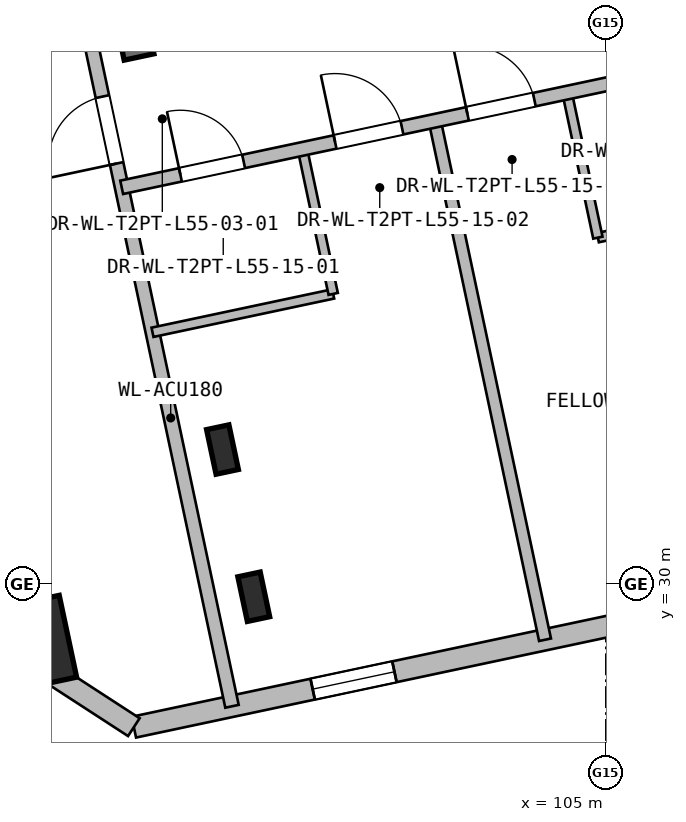
"""IFC4 building model, lengths in metres.
Left out: names, types, materials, properties, quantities, classifications, styles, units other than length and angle.
Written with IfcOpenShell. Run it as: python <this file> out.ifc"""

import sys

from ifc_helpers import new_model, si_unit, direction, frame, frame_2d, origin, origin_2d, place, context, subcontext, project, spatial, rectangle, hollow_rectangle, i_section, extrude, element, fill, save


model = new_model("IFC4")
c1 = context("Model", 3, precision=1e-05, world=origin(), true_north=direction((0.0, 1.0)))
c2 = subcontext(c1, "Body", "Model", "MODEL_VIEW")
j1 = project(units=[si_unit("LENGTHUNIT", "METRE"), si_unit("PLANEANGLEUNIT", "RADIAN")], contexts=[c1])
p1 = place(None, origin())
s1 = spatial("IfcSite", under=j1, at=p1, CompositionType="ELEMENT")
p2 = place(p1, origin())
s2 = spatial("IfcBuilding", under=s1, at=p2, CompositionType="ELEMENT")
p3 = place(p2, frame((0.0, 0.0, 201.3)))
s3 = spatial("IfcBuildingStorey", under=s2, at=p3, CompositionType="ELEMENT", Elevation=201.3)
p4 = place(p3, frame((98.86, 36.934, 0.0), z_axis=(0.0, 0.0, 1.0), x_axis=(-0.20790924889, 0.978148119778, 0.0)))
e1 = element("IfcWall", 1, at=p4, inside=s3, PredefinedType="SHEAR", context=c2, shape_type="SweptSolid", body=[
    extrude(rectangle(XDim=10.12, YDim=0.4, at=frame_2d((5.06, 0.0))), origin(), (0.0, 0.0, 1.0), 4.2),
])
p5 = place(p3, frame((97.386, 29.198, 0.0), z_axis=(0.0, 0.0, 1.0), x_axis=(0.978147600734, 0.207911690818, 0.0)))
e2 = element("IfcColumn", 2, at=p5, inside=s3, PredefinedType="COLUMN", context=c2, shape_type="SweptSolid", body=[
    extrude(hollow_rectangle(XDim=1.1, YDim=1.1, WallThickness=0.032, at=origin_2d()), origin(), (0.0, 0.0, 1.0), 4.2),
])
for number, where, z_axis, x_axis in (
    (3, (100.37, 29.833, 0.0), (0.0, 0.0, 1.0), (0.978, 0.208, 0.0)),
    (4, (99.958, 31.769, 0.0), (0.0, 0.0, 1.0), (0.978, 0.208, 0.0)),
):
    element("IfcColumn", number, at=place(p3, frame(where, z_axis=z_axis, x_axis=x_axis)), inside=s3, PredefinedType="COLUMN", context=c2, shape_type="SweptSolid", body=[
        extrude(i_section(OverallWidth=0.3, OverallDepth=0.6, WebThickness=0.014, FlangeThickness=0.025, at=origin_2d()), origin(), (0.0, 0.0, 1.0), 4.2),
    ])
p6 = place(p3, frame((123.05, 33.273, 0.0), z_axis=(0.0, 0.0, 1.0), x_axis=(-0.97814726544, -0.207913268245, 0.0)))
e5 = element("IfcWall", 5, at=p6, inside=s3, PredefinedType="SOLIDWALL", context=c2, shape_type="SweptSolid", body=[
    extrude(rectangle(XDim=24.8, YDim=0.28, at=frame_2d((12.4, 0.0))), origin(), (0.0, 0.0, 1.0), 3.93),
])
p7 = place(p6, frame((21.295, 0.0, 0.8)))
e6 = element("IfcOpeningElement", 6, at=p7, cuts=e5, PredefinedType="OPENING", context=c2, shape_type="SweptSolid", body=[
    extrude(rectangle(XDim=1.1, YDim=1.5, at=frame_2d((0.55, 0.75))), frame((0.0, 0.15, 0.0), z_axis=(0.0, -1.0, 0.0), x_axis=(1.0, 0.0, 0.0)), (0.0, 0.0, 1.0), 0.3),
])
p8 = place(p6, frame((11.486, 0.0, 0.8)))
e7 = element("IfcOpeningElement", 7, at=p8, cuts=e5, PredefinedType="OPENING", context=c2, shape_type="SweptSolid", body=[
    extrude(rectangle(XDim=2.05, YDim=1.9, at=frame_2d((1.025, 0.95))), frame((0.0, 0.15, 0.0), z_axis=(0.0, -1.0, 0.0), x_axis=(1.0, 0.0, 0.0)), (0.0, 0.0, 1.0), 0.3),
])
p9 = place(p6, frame((2.472, 0.0, 0.8)))
e8 = element("IfcOpeningElement", 8, at=p9, cuts=e5, PredefinedType="OPENING", context=c2, shape_type="SweptSolid", body=[
    extrude(rectangle(XDim=1.1, YDim=1.5, at=frame_2d((0.55, 0.75))), frame((0.0, 0.15, 0.0), z_axis=(0.0, -1.0, 0.0), x_axis=(1.0, 0.0, 0.0)), (0.0, 0.0, 1.0), 0.3),
])
p10 = place(p3, frame((98.792, 28.117, 0.0), z_axis=(0.0, 0.0, 1.0), x_axis=(-0.838672309694, 0.544636352948, 0.0)))
e9 = element("IfcWall", 9, at=p10, inside=s3, PredefinedType="SOLIDWALL", context=c2, shape_type="SweptSolid", body=[
    extrude(rectangle(XDim=3.535, YDim=0.28, at=frame_2d((1.768, 0.0))), origin(), (0.0, 0.0, 1.0), 3.93),
])
p11 = place(p3, frame((100.083, 28.391, 0.0), z_axis=(0.0, 0.0, 1.0), x_axis=(-0.207908966823, 0.978148179733, 0.0)))
e10 = element("IfcWall", 10, at=p11, inside=s3, PredefinedType="PARTITIONING", context=c2, shape_type="SweptSolid", body=[
    extrude(rectangle(XDim=9.13, YDim=0.18, at=frame_2d((4.565, 0.0))), origin(), (0.0, 0.0, 1.0), 3.93),
])
p12 = place(p11, frame((7.3, 0.0, 0.0)))
e11 = element("IfcOpeningElement", 11, at=p12, cuts=e10, PredefinedType="OPENING", context=c2, shape_type="SweptSolid", body=[
    extrude(rectangle(XDim=0.9, YDim=2.05, at=frame_2d((0.45, 1.025))), frame((0.0, 0.1, 0.0), z_axis=(0.0, -1.0, 0.0), x_axis=(1.0, 0.0, 0.0)), (0.0, 0.0, 1.0), 0.2),
])
p13 = place(p3, frame((99.037, 33.312, 0.0), z_axis=(0.0, 0.0, 1.0), x_axis=(0.978165487905, 0.207827520484, 0.0)))
e12 = element("IfcWall", 12, at=p13, inside=s3, PredefinedType="PARTITIONING", context=c2, shape_type="SweptSolid", body=[
    extrude(rectangle(XDim=2.43, YDim=0.125, at=frame_2d((1.215, 0.0))), origin(), (0.0, 0.0, 1.0), 3.93),
])
p14 = place(p3, frame((101.415, 33.817, 0.0), z_axis=(0.0, 0.0, 1.0), x_axis=(-0.207947096322, 0.978140074392, 0.0)))
e13 = element("IfcWall", 13, at=p14, inside=s3, PredefinedType="PARTITIONING", context=c2, shape_type="SweptSolid", body=[
    extrude(rectangle(XDim=1.95, YDim=0.125, at=frame_2d((0.975, 0.0))), origin(), (0.0, 0.0, 1.0), 3.93),
])
p15 = place(p3, frame((104.202, 29.267, 0.0), z_axis=(0.0, 0.0, 1.0), x_axis=(-0.207906863497, 0.9781486268, 0.0)))
e14 = element("IfcWall", 14, at=p15, inside=s3, PredefinedType="PARTITIONING", context=c2, shape_type="SweptSolid", body=[
    extrude(rectangle(XDim=6.98, YDim=0.16, at=frame_2d((3.49, 0.0))), origin(), (0.0, 0.0, 1.0), 3.93),
])
p16 = place(p3, frame((104.897, 34.557, 0.0), z_axis=(0.0, 0.0, 1.0), x_axis=(0.978155341176, 0.207875271565, 0.0)))
e15 = element("IfcWall", 15, at=p16, inside=s3, PredefinedType="PARTITIONING", context=c2, shape_type="SweptSolid", body=[
    extrude(rectangle(XDim=2.652, YDim=0.125, at=frame_2d((1.326, 0.0))), origin(), (0.0, 0.0, 1.0), 3.93),
])
p17 = place(p3, frame((104.897, 34.557, 0.0), z_axis=(0.0, 0.0, 1.0), x_axis=(-0.207947096322, 0.978140074392, 0.0)))
e16 = element("IfcWall", 16, at=p17, inside=s3, PredefinedType="PARTITIONING", context=c2, shape_type="SweptSolid", body=[
    extrude(rectangle(XDim=1.95, YDim=0.125, at=frame_2d((0.975, 0.0))), origin(), (0.0, 0.0, 1.0), 3.93),
])
p18 = place(p3, frame((98.632, 35.219, 0.0), z_axis=(0.0, 0.0, 1.0), x_axis=(0.978146753289, 0.207915677691, 0.0)))
e17 = element("IfcWall", 17, at=p18, inside=s3, PredefinedType="PARTITIONING", context=c2, shape_type="SweptSolid", body=[
    extrude(rectangle(XDim=22.16, YDim=0.18, at=frame_2d((11.08, 0.0))), origin(), (0.0, 0.0, 1.0), 3.93),
])
p19 = place(p18, frame((0.79, 0.0, 0.0)))
e18 = element("IfcOpeningElement", 18, at=p19, cuts=e17, PredefinedType="OPENING", context=c2, shape_type="SweptSolid", body=[
    extrude(rectangle(XDim=0.85, YDim=2.05, at=frame_2d((0.425, 1.025))), frame((0.0, 0.1, 0.0), z_axis=(0.0, -1.0, 0.0), x_axis=(1.0, 0.0, 0.0)), (0.0, 0.0, 1.0), 0.2),
])
p20 = place(p18, frame((2.87, 0.0, 0.0)))
e19 = element("IfcOpeningElement", 19, at=p20, cuts=e17, PredefinedType="OPENING", context=c2, shape_type="SweptSolid", body=[
    extrude(rectangle(XDim=0.9, YDim=2.05, at=frame_2d((0.45, 1.025))), frame((0.0, 0.1, 0.0), z_axis=(0.0, -1.0, 0.0), x_axis=(1.0, 0.0, 0.0)), (0.0, 0.0, 1.0), 0.2),
])
p21 = place(p18, frame((6.891, 0.0, 0.0)))
e20 = element("IfcOpeningElement", 20, at=p21, cuts=e17, PredefinedType="OPENING", context=c2, shape_type="SweptSolid", body=[
    extrude(rectangle(XDim=0.85, YDim=2.05, at=frame_2d((0.425, 1.025))), frame((0.0, 0.1, 0.0), z_axis=(0.0, -1.0, 0.0), x_axis=(1.0, 0.0, 0.0)), (0.0, 0.0, 1.0), 0.2),
])
p22 = place(p18, frame((4.65, 0.0, 0.0)))
e21 = element("IfcOpeningElement", 21, at=p22, cuts=e17, PredefinedType="OPENING", context=c2, shape_type="SweptSolid", body=[
    extrude(rectangle(XDim=0.9, YDim=2.05, at=frame_2d((0.45, 1.025))), frame((0.0, 0.1, 0.0), z_axis=(0.0, -1.0, 0.0), x_axis=(1.0, 0.0, 0.0)), (0.0, 0.0, 1.0), 0.2),
])
p23 = place(p18, frame((10.494, 0.0, 0.0)))
e22 = element("IfcOpeningElement", 22, at=p23, cuts=e17, PredefinedType="OPENING", context=c2, shape_type="SweptSolid", body=[
    extrude(rectangle(XDim=0.95, YDim=2.1, at=frame_2d((0.475, 1.05))), frame((0.0, 0.1, 0.0), z_axis=(0.0, -1.0, 0.0), x_axis=(1.0, 0.0, 0.0)), (0.0, 0.0, 1.0), 0.2),
])
p24 = place(p18, frame((15.037, 0.0, 0.0)))
e23 = element("IfcOpeningElement", 23, at=p24, cuts=e17, PredefinedType="OPENING", context=c2, shape_type="SweptSolid", body=[
    extrude(rectangle(XDim=0.98, YDim=2.1, at=frame_2d((0.49, 1.05))), frame((0.0, 0.1, 0.0), z_axis=(0.0, -1.0, 0.0), x_axis=(1.0, 0.0, 0.0)), (0.0, 0.0, 1.0), 0.2),
])
p25 = place(p18, frame((20.409, 0.0, 0.0)))
e24 = element("IfcOpeningElement", 24, at=p25, cuts=e17, PredefinedType="OPENING", context=c2, shape_type="SweptSolid", body=[
    extrude(rectangle(XDim=0.85, YDim=2.05, at=frame_2d((0.425, 1.025))), frame((0.0, 0.1, 0.0), z_axis=(0.0, -1.0, 0.0), x_axis=(1.0, 0.0, 0.0)), (0.0, 0.0, 1.0), 0.2),
])
p26 = place(p18, frame((18.168, 0.0, 0.0)))
e25 = element("IfcOpeningElement", 25, at=p26, cuts=e17, PredefinedType="OPENING", context=c2, shape_type="SweptSolid", body=[
    extrude(rectangle(XDim=0.9, YDim=2.05, at=frame_2d((0.45, 1.025))), frame((0.0, 0.1, 0.0), z_axis=(0.0, -1.0, 0.0), x_axis=(1.0, 0.0, 0.0)), (0.0, 0.0, 1.0), 0.2),
])
p27 = place(p7, origin())
e26 = element("IfcWindow", 26, at=p27, inside=s3, PartitioningType="SINGLE_PANEL", PredefinedType="WINDOW", context=c2, shape_type="SweptSolid", body=[
    extrude(rectangle(XDim=1.1, YDim=1.5, at=frame_2d((0.55, 0.75))), frame((0.0, 0.03, 0.0), z_axis=(0.0, -1.0, 0.0), x_axis=(1.0, 0.0, 0.0)), (0.0, 0.0, 1.0), 0.06),
])
fill(e6, e26)
p28 = place(p12, origin())
e27 = element("IfcDoor", 27, at=p28, inside=s3, OperationType="SINGLE_SWING_LEFT", PredefinedType="DOOR", context=c2, shape_type="SweptSolid", body=[
    extrude(rectangle(XDim=0.9, YDim=2.05, at=frame_2d((0.45, 1.025))), frame((0.0, 0.025, 0.0), z_axis=(0.0, -1.0, 0.0), x_axis=(1.0, 0.0, 0.0)), (0.0, 0.0, 1.0), 0.05),
])
fill(e11, e27)
p29 = place(p19, origin())
e28 = element("IfcDoor", 28, at=p29, inside=s3, OperationType="SINGLE_SWING_LEFT", PredefinedType="DOOR", context=c2, shape_type="SweptSolid", body=[
    extrude(rectangle(XDim=0.85, YDim=2.05, at=frame_2d((0.425, 1.025))), frame((0.0, 0.025, 0.0), z_axis=(0.0, -1.0, 0.0), x_axis=(1.0, 0.0, 0.0)), (0.0, 0.0, 1.0), 0.05),
])
fill(e18, e28)
p30 = place(p20, origin())
e29 = element("IfcDoor", 29, at=p30, inside=s3, OperationType="SINGLE_SWING_RIGHT", PredefinedType="DOOR", context=c2, shape_type="SweptSolid", body=[
    extrude(rectangle(XDim=0.9, YDim=2.05, at=frame_2d((0.45, 1.025))), frame((0.0, 0.025, 0.0), z_axis=(0.0, -1.0, 0.0), x_axis=(1.0, 0.0, 0.0)), (0.0, 0.0, 1.0), 0.05),
])
fill(e19, e29)
p31 = place(p22, origin())
e30 = element("IfcDoor", 30, at=p31, inside=s3, OperationType="SINGLE_SWING_RIGHT", PredefinedType="DOOR", context=c2, shape_type="SweptSolid", body=[
    extrude(rectangle(XDim=0.9, YDim=2.05, at=frame_2d((0.45, 1.025))), frame((0.0, 0.025, 0.0), z_axis=(0.0, -1.0, 0.0), x_axis=(1.0, 0.0, 0.0)), (0.0, 0.0, 1.0), 0.05),
])
fill(e21, e30)
save(model, sys.argv[1])
